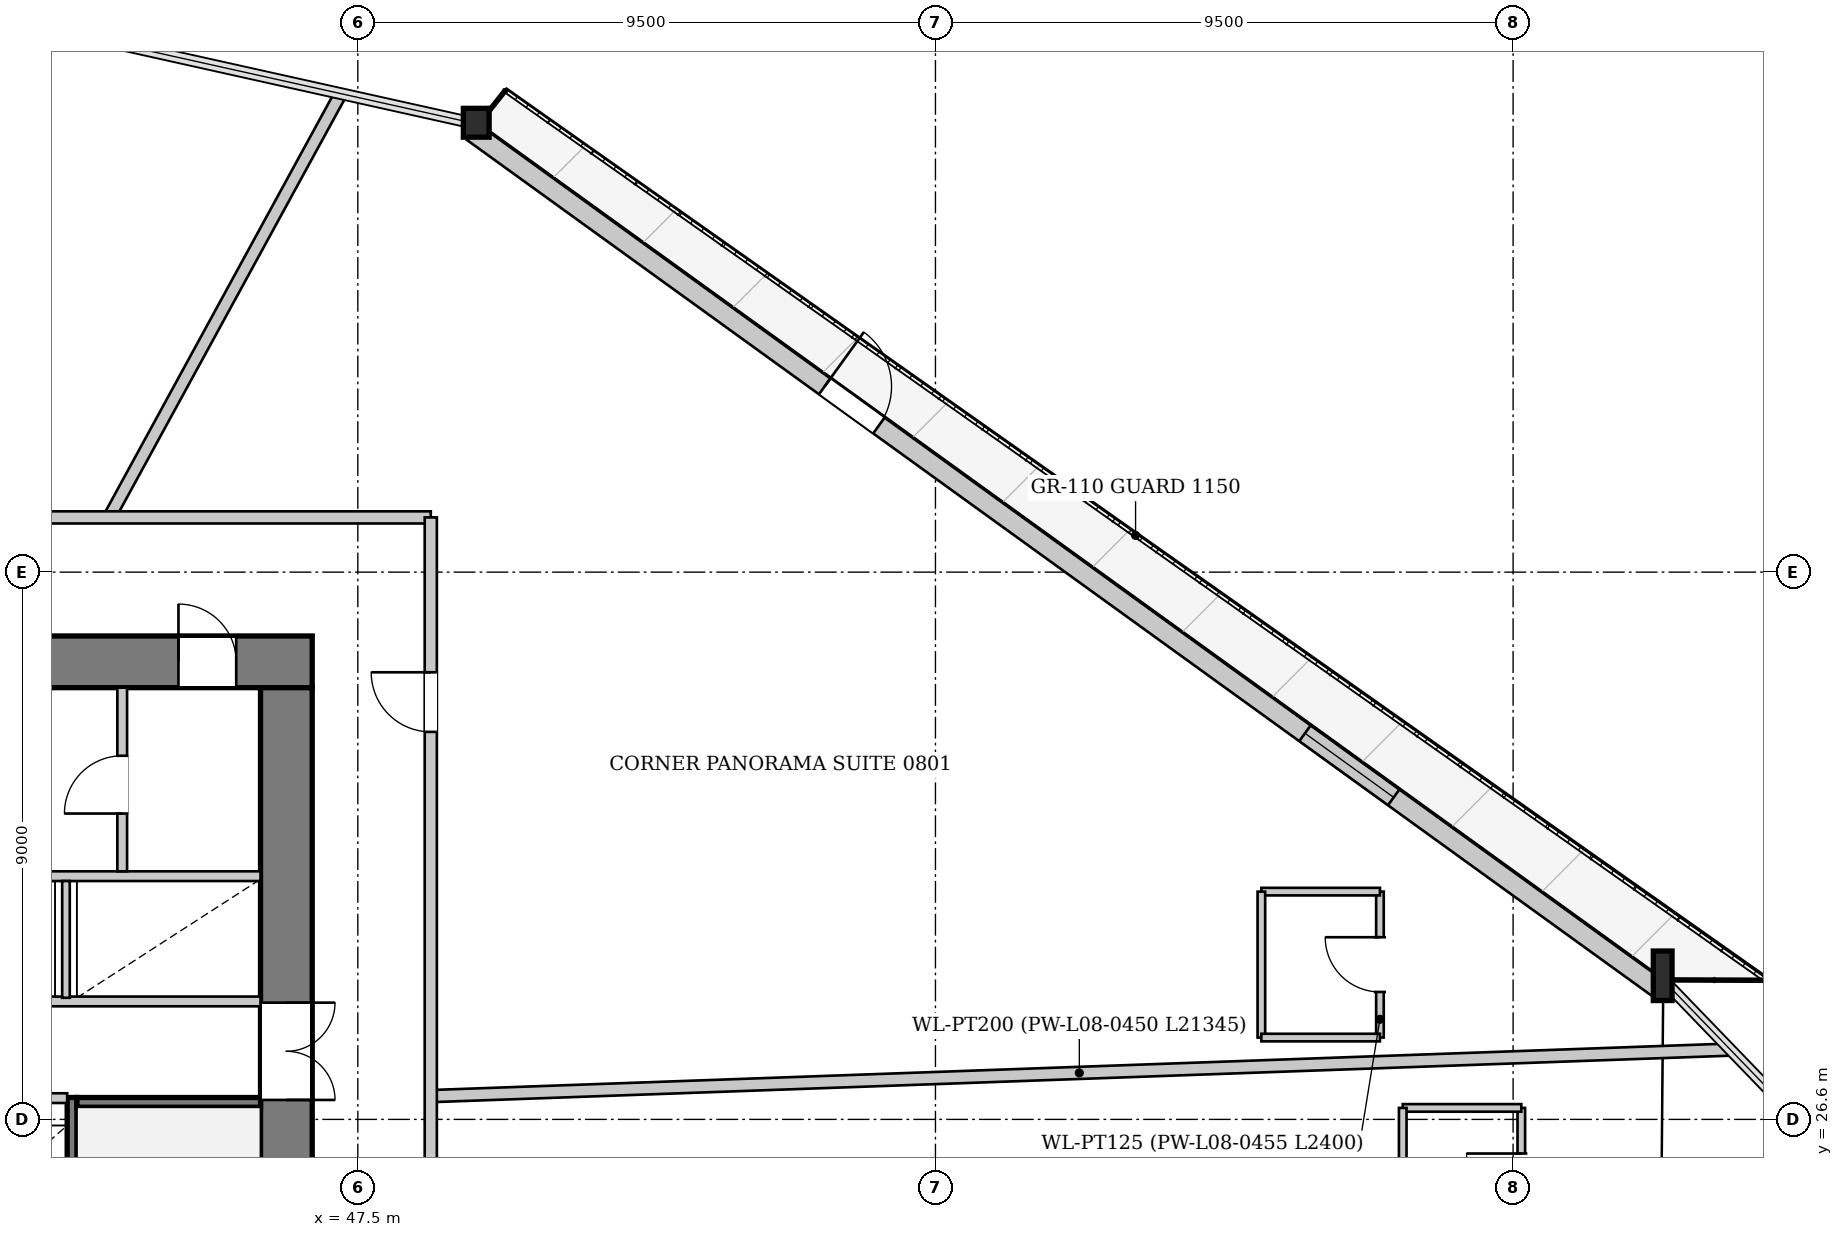
"""IFC4 building model, lengths in metres.
Left out: names, types, materials, properties, quantities, classifications, styles, units other than length and angle.
Written with IfcOpenShell. Run it as: python <this file> out.ifc"""

import sys

from ifc_helpers import new_model, si_unit, direction, frame, frame_2d, origin, origin_2d, place, context, subcontext, project, spatial, rectangle, i_section, extrude, source, transform, mapped, element, fill, save


model = new_model("IFC4")
c1 = context("Model", 3, precision=1e-05, world=origin(), true_north=direction((0.0, 1.0)))
c2 = subcontext(c1, "Body", "Model", "MODEL_VIEW")
j1 = project(units=[si_unit("LENGTHUNIT", "METRE"), si_unit("PLANEANGLEUNIT", "RADIAN")], contexts=[c1])
p1 = place(None, origin())
s1 = spatial("IfcSite", under=j1, at=p1, CompositionType="ELEMENT")
p2 = place(p1, origin())
s2 = spatial("IfcBuilding", under=s1, at=p2, CompositionType="ELEMENT")
p3 = place(p2, frame((0.0, 0.0, 36.4)))
s3 = spatial("IfcBuildingStorey", under=s2, at=p3, CompositionType="ELEMENT", Elevation=36.4)
m1 = source(origin(), c2, "Body", "SweptSolid", [
    extrude(i_section(OverallWidth=0.308, OverallDepth=0.814, WebThickness=0.021, FlangeThickness=0.04, at=origin_2d()), origin(), (0.0, 0.0, 1.0), 3.388),
])
p4 = place(p3, frame((68.965, 28.894, 0.0), z_axis=(-0.003026781141, 0.039924684572, 0.999198107563), x_axis=(-0.997138578155, -0.07559534347, 0.0)))
e1 = element("IfcColumn", 1, at=p4, inside=s3, PredefinedType="COLUMN", context=c2, shape_type="MappedRepresentation", body=[
    mapped(m1, transform((0.0, 0.0, 0.0), x_axis=(1.0, 0.0, 0.0), y_axis=(0.0, 1.0, 0.0), z_axis=(0.0, 0.0, 1.0), scale=1.0)),
])
m2 = source(origin(), c2, "Body", "SweptSolid", [
    extrude(i_section(OverallWidth=0.424, OverallDepth=0.474, WebThickness=0.043, FlangeThickness=0.068, at=origin_2d()), origin(), (0.0, 0.0, 1.0), 3.386),
])
p5 = place(p3, frame((49.483, 42.965, 0.0), z_axis=(-0.021125322681, 0.014780515869, 0.999667573292), x_axis=(-0.573274647321, -0.819363276416, 0.0)))
e2 = element("IfcColumn", 2, at=p5, inside=s3, PredefinedType="COLUMN", context=c2, shape_type="MappedRepresentation", body=[
    mapped(m2, transform((0.0, 0.0, 0.0), x_axis=(1.0, 0.0, 0.0), y_axis=(0.0, 1.0, 0.0), z_axis=(0.0, 0.0, 1.0), scale=1.0)),
])
p6 = place(p3, frame((49.39, 42.835, 0.0), z_axis=(0.0, 0.0, 1.0), x_axis=(0.810669048656, -0.585504648616, 0.0)))
e3 = element("IfcWall", 3, at=p6, inside=s3, PredefinedType="SOLIDWALL", context=c2, shape_type="SweptSolid", body=[
    extrude(rectangle(XDim=24.032, YDim=0.32, at=frame_2d((12.016, 0.0))), origin(), (0.0, 0.0, 1.0), 2.592),
])
p7 = place(p6, frame((7.14, 0.0, 0.0)))
e4 = element("IfcOpeningElement", 4, at=p7, cuts=e3, PredefinedType="OPENING", context=c2, shape_type="SweptSolid", body=[
    extrude(rectangle(XDim=1.1, YDim=2.3, at=frame_2d((0.55, 1.15))), frame((0.0, 0.17, 0.0), z_axis=(0.0, -1.0, 0.0), x_axis=(1.0, 0.0, 0.0)), (0.0, 0.0, 1.0), 0.34),
])
p8 = place(p6, frame((16.884, 0.0, 0.272)))
e5 = element("IfcOpeningElement", 5, at=p8, cuts=e3, PredefinedType="OPENING", context=c2, shape_type="SweptSolid", body=[
    extrude(rectangle(XDim=1.8, YDim=2.2, at=frame_2d((0.9, 1.1))), frame((0.0, 0.17, 0.0), z_axis=(0.0, -1.0, 0.0), x_axis=(1.0, 0.0, 0.0)), (0.0, 0.0, 1.0), 0.34),
])
p9 = place(p3, frame((29.25, 34.125, 0.0), z_axis=(0.0, 0.0, 1.0), x_axis=(1.0, 0.0, 0.0)))
e6 = element("IfcWall", 6, at=p9, inside=s3, PredefinedType="SHEAR", context=c2, shape_type="SweptSolid", body=[
    extrude(rectangle(XDim=17.5, YDim=0.85, at=frame_2d((8.75, 0.0))), origin(), (0.0, 0.0, 1.0), 3.3),
])
p10 = place(p9, frame((1.85, 0.0, 0.0)))
e7 = element("IfcOpeningElement", 7, at=p10, cuts=e6, PredefinedType="OPENING", context=c2, shape_type="SweptSolid", body=[
    extrude(rectangle(XDim=0.95, YDim=2.1, at=frame_2d((0.475, 1.05))), frame((0.0, 0.435, 0.0), z_axis=(0.0, -1.0, 0.0), x_axis=(1.0, 0.0, 0.0)), (0.0, 0.0, 1.0), 0.87),
])
p11 = place(p9, frame((4.23, 0.0, 0.0)))
e8 = element("IfcOpeningElement", 8, at=p11, cuts=e6, PredefinedType="OPENING", context=c2, shape_type="SweptSolid", body=[
    extrude(rectangle(XDim=1.32, YDim=2.2, at=frame_2d((0.66, 1.1))), frame((0.0, 0.435, 0.0), z_axis=(0.0, -1.0, 0.0), x_axis=(1.0, 0.0, 0.0)), (0.0, 0.0, 1.0), 0.87),
])
p12 = place(p9, frame((15.3, 0.0, 0.0)))
e9 = element("IfcOpeningElement", 9, at=p12, cuts=e6, PredefinedType="OPENING", context=c2, shape_type="SweptSolid", body=[
    extrude(rectangle(XDim=0.95, YDim=2.1, at=frame_2d((0.475, 1.05))), frame((0.0, 0.435, 0.0), z_axis=(0.0, -1.0, 0.0), x_axis=(1.0, 0.0, 0.0)), (0.0, 0.0, 1.0), 0.87),
])
p13 = place(p3, frame((46.325, 33.7, 0.0), z_axis=(0.0, 0.0, 1.0), x_axis=(0.0, -1.0, 0.0)))
e10 = element("IfcWall", 10, at=p13, inside=s3, PredefinedType="SHEAR", context=c2, shape_type="SweptSolid", body=[
    extrude(rectangle(XDim=14.2, YDim=0.85, at=frame_2d((7.1, 0.0))), origin(), (0.0, 0.0, 1.0), 3.3),
])
p14 = place(p13, frame((5.18, 0.0, 0.0)))
e11 = element("IfcOpeningElement", 11, at=p14, cuts=e10, PredefinedType="OPENING", context=c2, shape_type="SweptSolid", body=[
    extrude(rectangle(XDim=1.6, YDim=2.2, at=frame_2d((0.8, 1.1))), frame((0.0, 0.435, 0.0), z_axis=(0.0, -1.0, 0.0), x_axis=(1.0, 0.0, 0.0)), (0.0, 0.0, 1.0), 0.87),
])
p15 = place(p3, frame((42.8, 26.96, 0.0), z_axis=(0.0, 0.0, 1.0), x_axis=(0.0, -1.0, 0.0)))
e12 = element("IfcWall", 12, at=p15, inside=s3, PredefinedType="PARTITIONING", context=c2, shape_type="SweptSolid", body=[
    extrude(rectangle(XDim=7.46, YDim=0.16, at=frame_2d((3.73, 0.0))), origin(), (0.0, 0.0, 1.0), 3.3),
])
p16 = place(p15, frame((6.06, 0.0, 0.0)))
e13 = element("IfcOpeningElement", 13, at=p16, cuts=e12, PredefinedType="OPENING", context=c2, shape_type="SweptSolid", body=[
    extrude(rectangle(XDim=1.32, YDim=2.2, at=frame_2d((0.66, 1.1))), frame((0.0, 0.09, 0.0), z_axis=(0.0, -1.0, 0.0), x_axis=(1.0, 0.0, 0.0)), (0.0, 0.0, 1.0), 0.18),
])
p17 = place(p3, frame((42.88, 26.88, 0.0), z_axis=(0.0, 0.0, 1.0), x_axis=(1.0, 0.0, 0.0)))
e14 = element("IfcWall", 14, at=p17, inside=s3, PredefinedType="PARTITIONING", context=c2, shape_type="SweptSolid", body=[
    extrude(rectangle(XDim=3.02, YDim=0.16, at=frame_2d((1.51, 0.0))), origin(), (0.0, 0.0, 1.0), 3.3),
])
p18 = place(p3, frame((33.28, 26.95, 0.0), z_axis=(0.0, 0.0, 1.0), x_axis=(1.0, 0.0, 0.0)))
e15 = element("IfcWall", 15, at=p18, inside=s3, PredefinedType="PARTITIONING", context=c2, shape_type="SweptSolid", body=[
    extrude(rectangle(XDim=9.44, YDim=0.16, at=frame_2d((4.72, 0.0))), origin(), (0.0, 0.0, 1.0), 3.3),
])
p19 = place(p18, frame((0.26, 0.0, 0.0)))
e16 = element("IfcOpeningElement", 16, at=p19, cuts=e15, PredefinedType="OPENING", context=c2, shape_type="SweptSolid", body=[
    extrude(rectangle(XDim=1.1, YDim=2.2, at=frame_2d((0.55, 1.1))), frame((0.0, 0.09, 0.0), z_axis=(0.0, -1.0, 0.0), x_axis=(1.0, 0.0, 0.0)), (0.0, 0.0, 1.0), 0.18),
])
p20 = place(p18, frame((2.01, 0.0, 0.0)))
e17 = element("IfcOpeningElement", 17, at=p20, cuts=e15, PredefinedType="OPENING", context=c2, shape_type="SweptSolid", body=[
    extrude(rectangle(XDim=1.1, YDim=2.2, at=frame_2d((0.55, 1.1))), frame((0.0, 0.09, 0.0), z_axis=(0.0, -1.0, 0.0), x_axis=(1.0, 0.0, 0.0)), (0.0, 0.0, 1.0), 0.18),
])
p21 = place(p18, frame((3.76, 0.0, 0.0)))
e18 = element("IfcOpeningElement", 18, at=p21, cuts=e15, PredefinedType="OPENING", context=c2, shape_type="SweptSolid", body=[
    extrude(rectangle(XDim=1.1, YDim=2.2, at=frame_2d((0.55, 1.1))), frame((0.0, 0.09, 0.0), z_axis=(0.0, -1.0, 0.0), x_axis=(1.0, 0.0, 0.0)), (0.0, 0.0, 1.0), 0.18),
])
p22 = place(p18, frame((5.51, 0.0, 0.0)))
e19 = element("IfcOpeningElement", 19, at=p22, cuts=e15, PredefinedType="OPENING", context=c2, shape_type="SweptSolid", body=[
    extrude(rectangle(XDim=1.1, YDim=2.2, at=frame_2d((0.55, 1.1))), frame((0.0, 0.09, 0.0), z_axis=(0.0, -1.0, 0.0), x_axis=(1.0, 0.0, 0.0)), (0.0, 0.0, 1.0), 0.18),
])
p23 = place(p3, frame((33.28, 28.54, 0.0), z_axis=(0.0, 0.0, 1.0), x_axis=(1.0, 0.0, 0.0)))
e20 = element("IfcWall", 20, at=p23, inside=s3, PredefinedType="PARTITIONING", context=c2, shape_type="SweptSolid", body=[
    extrude(rectangle(XDim=12.62, YDim=0.16, at=frame_2d((6.31, 0.0))), origin(), (0.0, 0.0, 1.0), 3.3),
])
p24 = place(p3, frame((40.72, 30.6, 0.0), z_axis=(0.0, 0.0, 1.0), x_axis=(1.0, 0.0, 0.0)))
e21 = element("IfcWall", 21, at=p24, inside=s3, PredefinedType="PARTITIONING", context=c2, shape_type="SweptSolid", body=[
    extrude(rectangle(XDim=5.18, YDim=0.16, at=frame_2d((2.59, 0.0))), origin(), (0.0, 0.0, 1.0), 3.3),
])
p25 = place(p3, frame((42.7, 28.6, 0.0), z_axis=(0.0, 0.0, 1.0), x_axis=(0.0, 1.0, 0.0)))
e22 = element("IfcWall", 22, at=p25, inside=s3, PredefinedType="PARTITIONING", context=c2, shape_type="SweptSolid", body=[
    extrude(rectangle(XDim=1.92, YDim=0.125, at=frame_2d((0.96, 0.0))), origin(), (0.0, 0.0, 1.0), 3.3),
])
p26 = place(p3, frame((43.625, 30.68, 0.0), z_axis=(0.0, 0.0, 1.0), x_axis=(0.0, 1.0, 0.0)))
e23 = element("IfcWall", 23, at=p26, inside=s3, PredefinedType="PARTITIONING", context=c2, shape_type="SweptSolid", body=[
    extrude(rectangle(XDim=3.02, YDim=0.16, at=frame_2d((1.51, 0.0))), origin(), (0.0, 0.0, 1.0), 3.3),
])
p27 = place(p26, frame((0.95, 0.0, 0.0)))
e24 = element("IfcOpeningElement", 24, at=p27, cuts=e23, PredefinedType="OPENING", context=c2, shape_type="SweptSolid", body=[
    extrude(rectangle(XDim=0.95, YDim=2.1, at=frame_2d((0.475, 1.05))), frame((0.0, 0.09, 0.0), z_axis=(0.0, -1.0, 0.0), x_axis=(1.0, 0.0, 0.0)), (0.0, 0.0, 1.0), 0.18),
])
p28 = place(p3, frame((48.7, 26.983, 0.0), z_axis=(0.0, 0.0, 1.0), x_axis=(0.999359805542, 0.035776795099, 0.0)))
e25 = element("IfcWall", 25, at=p28, inside=s3, PredefinedType="PARTITIONING", context=c2, shape_type="SweptSolid", body=[
    extrude(rectangle(XDim=21.345, YDim=0.2, at=frame_2d((10.673, 0.0))), origin(), (0.0, 0.0, 1.0), 3.3),
])
p29 = place(p3, frame((43.41, 36.5, 0.0), z_axis=(0.0, 0.0, 1.0), x_axis=(0.479541725487, 0.87751907872, 0.0)))
e26 = element("IfcWall", 26, at=p29, inside=s3, PredefinedType="PARTITIONING", context=c2, shape_type="SweptSolid", body=[
    extrude(rectangle(XDim=7.911, YDim=0.2, at=frame_2d((3.956, 0.0))), origin(), (0.0, 0.0, 1.0), 3.3),
])
p30 = place(p3, frame((64.31, 27.946, 0.0), z_axis=(0.0, 0.0, 1.0), x_axis=(0.0, 1.0, 0.0)))
e27 = element("IfcWall", 27, at=p30, inside=s3, PredefinedType="PARTITIONING", context=c2, shape_type="SweptSolid", body=[
    extrude(rectangle(XDim=2.4, YDim=0.125, at=frame_2d((1.2, 0.0))), origin(), (0.0, 0.0, 1.0), 3.3),
])
p31 = place(p30, frame((0.75, 0.0, 0.0)))
e28 = element("IfcOpeningElement", 28, at=p31, cuts=e27, PredefinedType="OPENING", context=c2, shape_type="SweptSolid", body=[
    extrude(rectangle(XDim=0.9, YDim=2.1, at=frame_2d((0.45, 1.05))), frame((0.0, 0.073, 0.0), z_axis=(0.0, -1.0, 0.0), x_axis=(1.0, 0.0, 0.0)), (0.0, 0.0, 1.0), 0.145),
])
p32 = place(p3, frame((64.31, 30.346, 0.0), z_axis=(0.0, 0.0, 1.0), x_axis=(-1.0, 0.0, 0.0)))
e29 = element("IfcWall", 29, at=p32, inside=s3, PredefinedType="PARTITIONING", context=c2, shape_type="SweptSolid", body=[
    extrude(rectangle(XDim=1.95, YDim=0.125, at=frame_2d((0.975, 0.0))), origin(), (0.0, 0.0, 1.0), 3.3),
])
p33 = place(p3, frame((62.36, 30.346, 0.0), z_axis=(0.0, 0.0, 1.0), x_axis=(0.0, -1.0, 0.0)))
e30 = element("IfcWall", 30, at=p33, inside=s3, PredefinedType="PARTITIONING", context=c2, shape_type="SweptSolid", body=[
    extrude(rectangle(XDim=2.4, YDim=0.125, at=frame_2d((1.2, 0.0))), origin(), (0.0, 0.0, 1.0), 3.3),
])
p34 = place(p3, frame((62.36, 27.946, 0.0), z_axis=(0.0, 0.0, 1.0), x_axis=(1.0, 0.0, 0.0)))
e31 = element("IfcWall", 31, at=p34, inside=s3, PredefinedType="PARTITIONING", context=c2, shape_type="SweptSolid", body=[
    extrude(rectangle(XDim=1.95, YDim=0.125, at=frame_2d((0.975, 0.0))), origin(), (0.0, 0.0, 1.0), 3.3),
])
p35 = place(p3, frame((66.635, 24.389, 0.0), z_axis=(0.0, 0.0, 1.0), x_axis=(0.0, 1.0, 0.0)))
e32 = element("IfcWall", 32, at=p35, inside=s3, PredefinedType="PARTITIONING", context=c2, shape_type="SweptSolid", body=[
    extrude(rectangle(XDim=2.4, YDim=0.125, at=frame_2d((1.2, 0.0))), origin(), (0.0, 0.0, 1.0), 3.3),
])
p36 = place(p35, frame((0.75, 0.0, 0.0)))
e33 = element("IfcOpeningElement", 33, at=p36, cuts=e32, PredefinedType="OPENING", context=c2, shape_type="SweptSolid", body=[
    extrude(rectangle(XDim=0.9, YDim=2.1, at=frame_2d((0.45, 1.05))), frame((0.0, 0.073, 0.0), z_axis=(0.0, -1.0, 0.0), x_axis=(1.0, 0.0, 0.0)), (0.0, 0.0, 1.0), 0.145),
])
p37 = place(p3, frame((66.635, 26.789, 0.0), z_axis=(0.0, 0.0, 1.0), x_axis=(-1.0, 0.0, 0.0)))
e34 = element("IfcWall", 34, at=p37, inside=s3, PredefinedType="PARTITIONING", context=c2, shape_type="SweptSolid", body=[
    extrude(rectangle(XDim=1.95, YDim=0.125, at=frame_2d((0.975, 0.0))), origin(), (0.0, 0.0, 1.0), 2.795),
])
p38 = place(p3, frame((64.685, 26.789, 0.0), z_axis=(0.0, 0.0, 1.0), x_axis=(0.0, -1.0, 0.0)))
e35 = element("IfcWall", 35, at=p38, inside=s3, PredefinedType="PARTITIONING", context=c2, shape_type="SweptSolid", body=[
    extrude(rectangle(XDim=2.4, YDim=0.125, at=frame_2d((1.2, 0.0))), origin(), (0.0, 0.0, 1.0), 3.3),
])
p39 = place(p3, frame((27.3, 36.5, 0.0), z_axis=(0.0, 0.0, 1.0), x_axis=(1.0, 0.0, 0.0)))
e36 = element("IfcWall", 36, at=p39, inside=s3, PredefinedType="PARTITIONING", context=c2, shape_type="SweptSolid", body=[
    extrude(rectangle(XDim=21.4, YDim=0.2, at=frame_2d((10.7, 0.0))), origin(), (0.0, 0.0, 1.0), 3.3),
])
p40 = place(p39, frame((4.484, 0.0, 0.0)))
e37 = element("IfcOpeningElement", 37, at=p40, cuts=e36, PredefinedType="OPENING", context=c2, shape_type="SweptSolid", body=[
    extrude(rectangle(XDim=0.98, YDim=2.15, at=frame_2d((0.49, 1.075))), frame((0.0, 0.11, 0.0), z_axis=(0.0, -1.0, 0.0), x_axis=(1.0, 0.0, 0.0)), (0.0, 0.0, 1.0), 0.22),
])
p41 = place(p3, frame((48.7, 16.7, 0.0), z_axis=(0.0, 0.0, 1.0), x_axis=(0.0, 1.0, 0.0)))
e38 = element("IfcWall", 38, at=p41, inside=s3, PredefinedType="PARTITIONING", context=c2, shape_type="SweptSolid", body=[
    extrude(rectangle(XDim=19.8, YDim=0.2, at=frame_2d((9.9, 0.0))), origin(), (0.0, 0.0, 1.0), 3.3),
])
p42 = place(p41, frame((16.273, 0.0, 0.0)))
e39 = element("IfcOpeningElement", 39, at=p42, cuts=e38, PredefinedType="OPENING", context=c2, shape_type="SweptSolid", body=[
    extrude(rectangle(XDim=0.98, YDim=2.15, at=frame_2d((0.49, 1.075))), frame((0.0, 0.11, 0.0), z_axis=(0.0, -1.0, 0.0), x_axis=(1.0, 0.0, 0.0)), (0.0, 0.0, 1.0), 0.22),
])
p43 = place(p41, frame((4.331, 0.0, 0.0)))
e40 = element("IfcOpeningElement", 40, at=p43, cuts=e38, PredefinedType="OPENING", context=c2, shape_type="SweptSolid", body=[
    extrude(rectangle(XDim=0.98, YDim=2.15, at=frame_2d((0.49, 1.075))), frame((0.0, 0.11, 0.0), z_axis=(0.0, -1.0, 0.0), x_axis=(1.0, 0.0, 0.0)), (0.0, 0.0, 1.0), 0.22),
])
m3 = source(origin(), c2, "Body", "SweptSolid", [
    extrude(rectangle(XDim=1.1, YDim=2.3, at=frame_2d((0.55, 1.15))), frame((0.0, 0.025, 0.0), z_axis=(0.0, -1.0, 0.0), x_axis=(1.0, 0.0, 0.0)), (0.0, 0.0, 1.0), 0.05),
])
p44 = place(p7, origin())
e41 = element("IfcDoor", 41, at=p44, inside=s3, OperationType="SINGLE_SWING_LEFT", PredefinedType="DOOR", context=c2, shape_type="MappedRepresentation", body=[
    mapped(m3, transform((0.0, 0.0, 0.0), x_axis=(1.0, 0.0, 0.0), y_axis=(0.0, 1.0, 0.0), z_axis=(0.0, 0.0, 1.0), scale=1.0)),
])
fill(e4, e41)
m4 = source(origin(), c2, "Body", "SweptSolid", [
    extrude(rectangle(XDim=1.8, YDim=2.2, at=frame_2d((0.9, 1.1))), frame((0.0, 0.03, 0.0), z_axis=(0.0, -1.0, 0.0), x_axis=(1.0, 0.0, 0.0)), (0.0, 0.0, 1.0), 0.06),
])
p45 = place(p8, origin())
e42 = element("IfcWindow", 42, at=p45, inside=s3, PartitioningType="SINGLE_PANEL", PredefinedType="WINDOW", context=c2, shape_type="MappedRepresentation", body=[
    mapped(m4, transform((0.0, 0.0, 0.0), x_axis=(1.0, 0.0, 0.0), y_axis=(0.0, 1.0, 0.0), z_axis=(0.0, 0.0, 1.0), scale=1.0)),
])
fill(e5, e42)
m5 = source(origin(), c2, "Body", "SweptSolid", [
    extrude(rectangle(XDim=1.6, YDim=2.2, at=frame_2d((0.8, 1.1))), frame((0.0, 0.025, 0.0), z_axis=(0.0, -1.0, 0.0), x_axis=(1.0, 0.0, 0.0)), (0.0, 0.0, 1.0), 0.05),
])
p46 = place(p14, origin())
e43 = element("IfcDoor", 43, at=p46, inside=s3, OperationType="DOUBLE_DOOR_SINGLE_SWING", PredefinedType="DOOR", context=c2, shape_type="MappedRepresentation", body=[
    mapped(m5, transform((0.0, 0.0, 0.0), x_axis=(1.0, 0.0, 0.0), y_axis=(0.0, 1.0, 0.0), z_axis=(0.0, 0.0, 1.0), scale=1.0)),
])
fill(e11, e43)
m6 = source(origin(), c2, "Body", "SweptSolid", [
    extrude(rectangle(XDim=0.95, YDim=2.1, at=frame_2d((0.475, 1.05))), frame((0.0, 0.025, 0.0), z_axis=(0.0, -1.0, 0.0), x_axis=(1.0, 0.0, 0.0)), (0.0, 0.0, 1.0), 0.05),
])
p47 = place(p27, origin())
e44 = element("IfcDoor", 44, at=p47, inside=s3, OperationType="SINGLE_SWING_LEFT", PredefinedType="DOOR", context=c2, shape_type="MappedRepresentation", body=[
    mapped(m6, transform((0.0, 0.0, 0.0), x_axis=(1.0, 0.0, 0.0), y_axis=(0.0, 1.0, 0.0), z_axis=(0.0, 0.0, 1.0), scale=1.0)),
])
fill(e24, e44)
p48 = place(p12, origin())
e45 = element("IfcDoor", 45, at=p48, inside=s3, OperationType="SINGLE_SWING_LEFT", PredefinedType="DOOR", context=c2, shape_type="MappedRepresentation", body=[
    mapped(m6, transform((0.0, 0.0, 0.0), x_axis=(1.0, 0.0, 0.0), y_axis=(0.0, 1.0, 0.0), z_axis=(0.0, 0.0, 1.0), scale=1.0)),
])
fill(e9, e45)
m7 = source(origin(), c2, "Body", "SweptSolid", [
    extrude(rectangle(XDim=0.9, YDim=2.1, at=frame_2d((0.45, 1.05))), frame((0.0, 0.025, 0.0), z_axis=(0.0, -1.0, 0.0), x_axis=(1.0, 0.0, 0.0)), (0.0, 0.0, 1.0), 0.05),
])
p49 = place(p31, origin())
e46 = element("IfcDoor", 46, at=p49, inside=s3, OperationType="SINGLE_SWING_RIGHT", PredefinedType="DOOR", context=c2, shape_type="MappedRepresentation", body=[
    mapped(m7, transform((0.0, 0.0, 0.0), x_axis=(1.0, 0.0, 0.0), y_axis=(0.0, 1.0, 0.0), z_axis=(0.0, 0.0, 1.0), scale=1.0)),
])
fill(e28, e46)
p50 = place(p36, origin())
e47 = element("IfcDoor", 47, at=p50, inside=s3, OperationType="SINGLE_SWING_RIGHT", PredefinedType="DOOR", context=c2, shape_type="MappedRepresentation", body=[
    mapped(m7, transform((0.0, 0.0, 0.0), x_axis=(1.0, 0.0, 0.0), y_axis=(0.0, 1.0, 0.0), z_axis=(0.0, 0.0, 1.0), scale=1.0)),
])
fill(e33, e47)
m8 = source(origin(), c2, "Body", "SweptSolid", [
    extrude(rectangle(XDim=0.98, YDim=2.15, at=frame_2d((0.49, 1.075))), frame((0.0, 0.025, 0.0), z_axis=(0.0, -1.0, 0.0), x_axis=(1.0, 0.0, 0.0)), (0.0, 0.0, 1.0), 0.05),
])
p51 = place(p42, origin())
e48 = element("IfcDoor", 48, at=p51, inside=s3, OperationType="SINGLE_SWING_RIGHT", PredefinedType="DOOR", context=c2, shape_type="MappedRepresentation", body=[
    mapped(m8, transform((0.0, 0.0, 0.0), x_axis=(1.0, 0.0, 0.0), y_axis=(0.0, 1.0, 0.0), z_axis=(0.0, 0.0, 1.0), scale=1.0)),
])
fill(e39, e48)
save(model, sys.argv[1])
